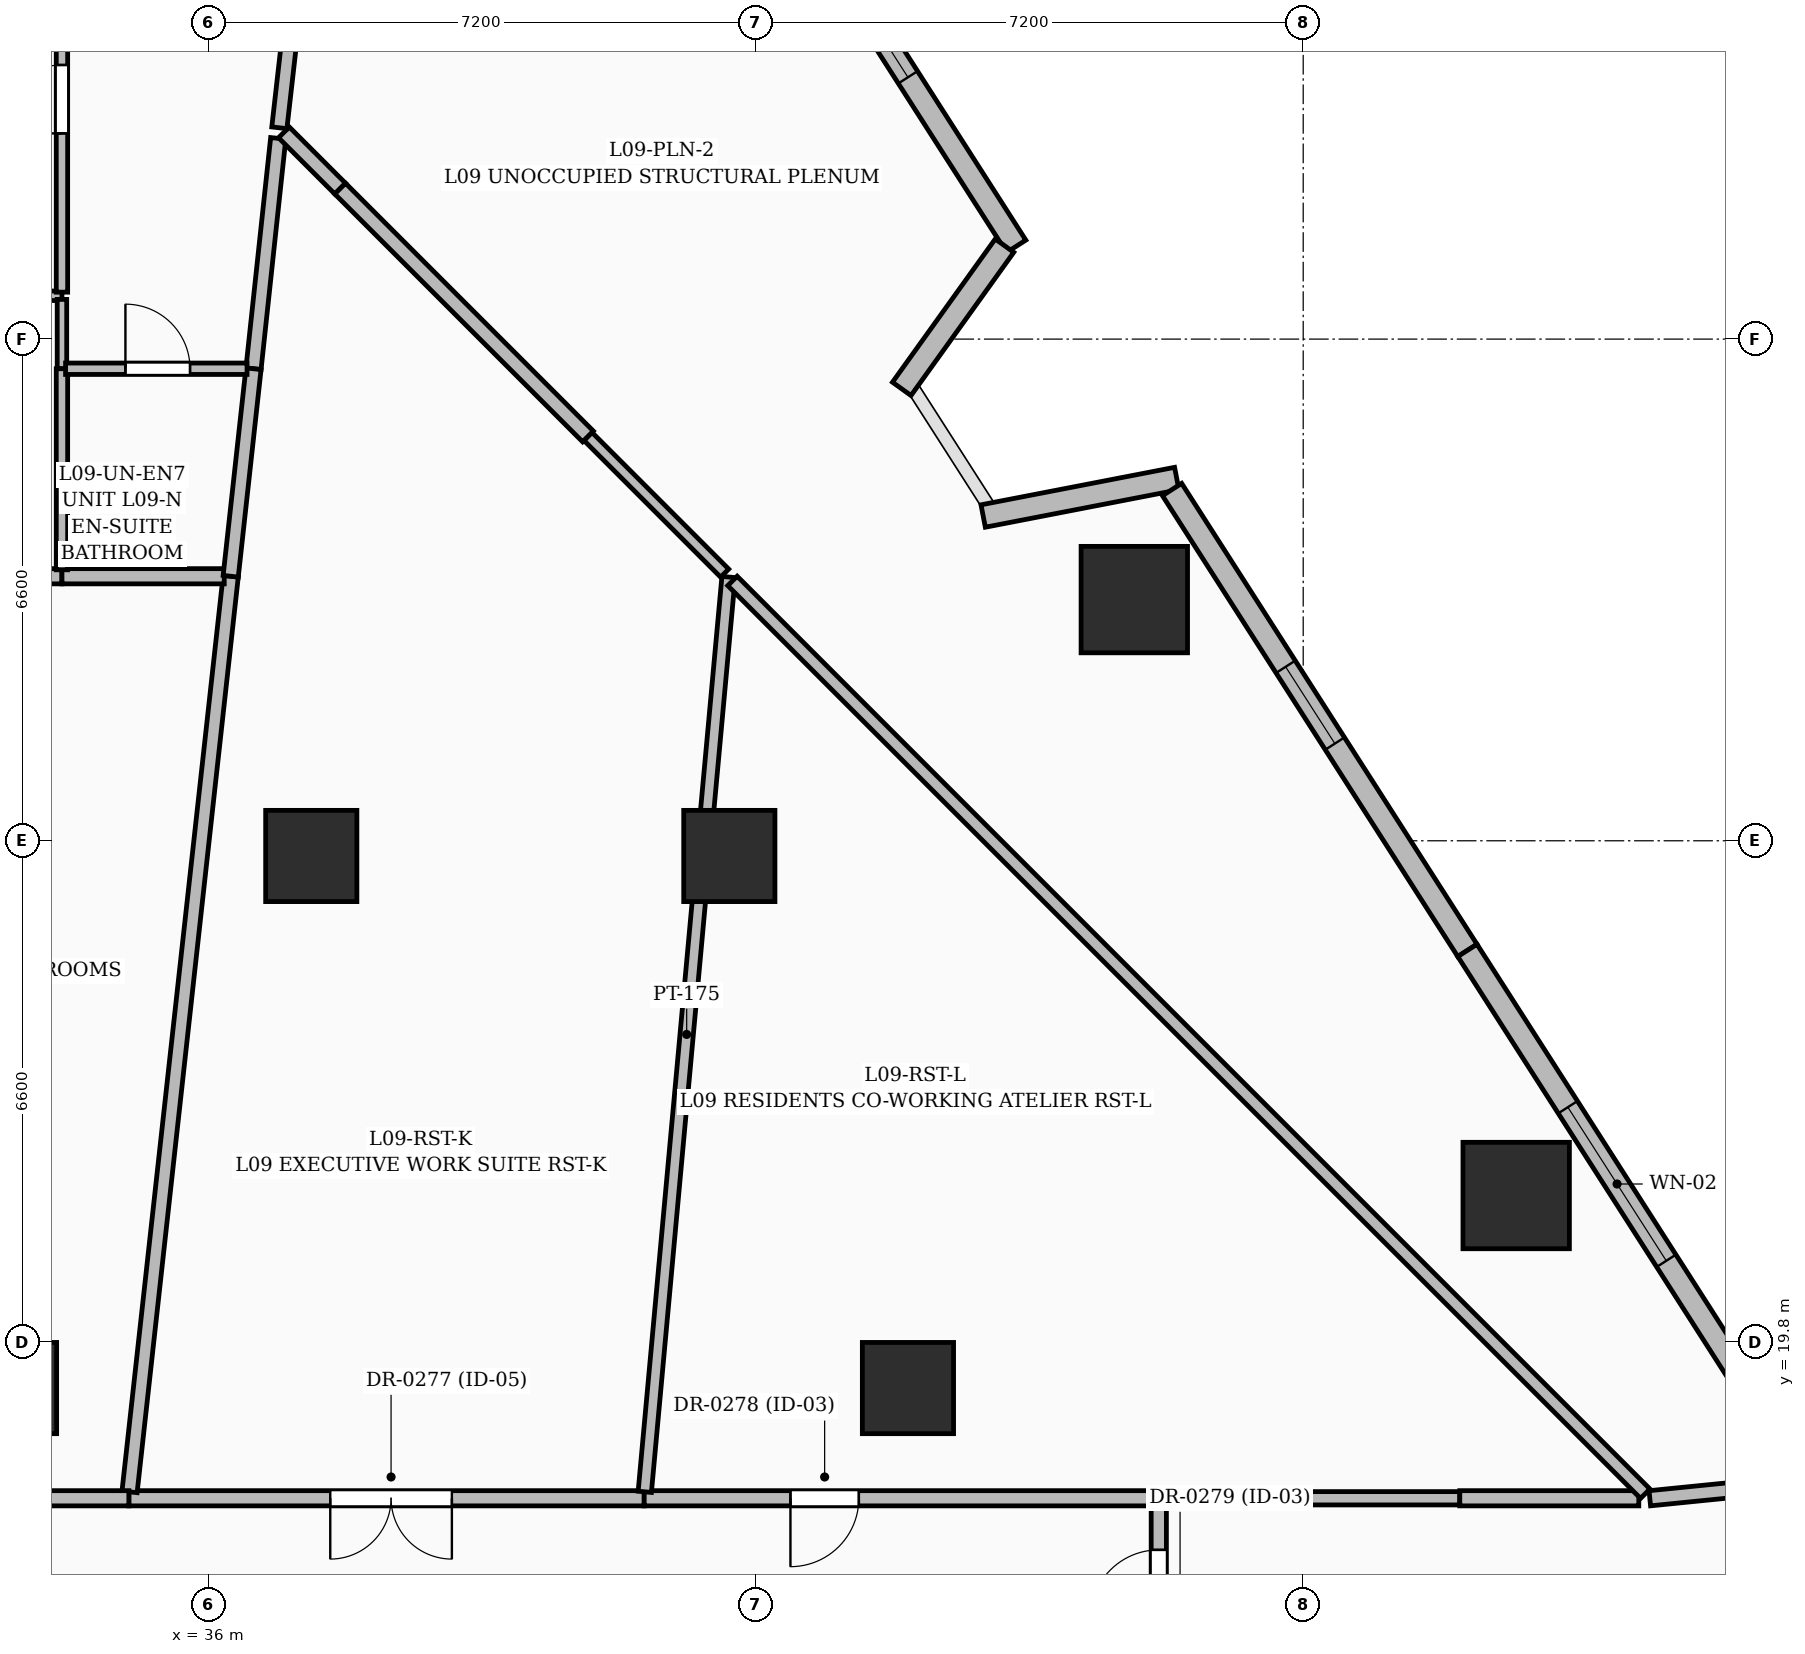
"""IFC4 building model, lengths in metres.
Left out: names, types, materials, properties, quantities, classifications, styles, units other than length and angle.
Written with IfcOpenShell. Run it as: python <this file> out.ifc"""

import sys

from ifc_helpers import new_model, si_unit, direction, frame, frame_2d, origin, origin_2d, place, context, subcontext, project, spatial, rectangle, extrude, element, fill, save


model = new_model("IFC4")
c1 = context("Model", 3, precision=1e-05, world=origin(), true_north=direction((0.0, 1.0)))
c2 = subcontext(c1, "Body", "Model", "MODEL_VIEW")
j1 = project(units=[si_unit("LENGTHUNIT", "METRE"), si_unit("PLANEANGLEUNIT", "RADIAN")], contexts=[c1])
p1 = place(None, origin())
s1 = spatial("IfcSite", under=j1, at=p1, CompositionType="ELEMENT")
p2 = place(p1, origin())
s2 = spatial("IfcBuilding", under=s1, at=p2, CompositionType="ELEMENT")
p3 = place(p2, frame((0.0, 0.0, 42.6)))
s3 = spatial("IfcBuildingStorey", under=s2, at=p3, CompositionType="ELEMENT", Elevation=42.6)
for number, where, z_axis, x_axis in (
    (1, (45.2, 19.2, 0.0), (0.0, 0.0, 1.0), (1.0, 0.0, 0.0)),
    (2, (42.85, 26.2, 0.0), (0.0, 0.0, 1.0), (1.0, 0.0, 0.0)),
    (3, (37.35, 26.2, 0.0), (0.0, 0.0, 1.0), (1.0, 0.0, 0.0)),
    (4, (33.4, 19.2, 0.0), (0.0, 0.0, 1.0), (1.0, 0.0, 0.0)),
):
    element("IfcColumn", number, at=place(p3, frame(where, z_axis=z_axis, x_axis=x_axis)), inside=s3, PredefinedType="COLUMN", context=c2, shape_type="SweptSolid", body=[
        extrude(rectangle(XDim=1.2, YDim=1.2, at=origin_2d()), origin(), (0.0, 0.0, 1.0), 3.6),
    ])
for number, where, z_axis, x_axis in (
    (5, (53.202, 21.733, 0.0), (0.0, 0.0, 1.0), (1.0, 0.0, 0.0)),
    (6, (48.178, 29.573, 0.0), (0.0, 0.0, 1.0), (1.0, 0.0, 0.0)),
):
    element("IfcColumn", number, at=place(p3, frame(where, z_axis=z_axis, x_axis=x_axis)), inside=s3, PredefinedType="COLUMN", context=c2, shape_type="SweptSolid", body=[
        extrude(rectangle(XDim=1.4, YDim=1.4, at=origin_2d()), origin(), (0.0, 0.0, 1.0), 3.6),
    ])
p4 = place(p3, frame((42.677, 40.381, 0.0), z_axis=(0.0, 0.0, 1.0), x_axis=(0.53953753152, -0.841961550239, 0.0)))
e7 = element("IfcWall", 7, at=p4, inside=s3, PredefinedType="SOLIDWALL", context=c2, shape_type="SweptSolid", body=[
    extrude(rectangle(XDim=7.316, YDim=0.3, at=frame_2d((3.658, 0.0))), origin(), (0.0, 0.0, 1.0), 3.35),
])
p5 = place(p4, frame((2.875, 0.0, 0.6)))
e8 = element("IfcOpeningElement", 8, at=p5, cuts=e7, PredefinedType="OPENING", context=c2, shape_type="SweptSolid", body=[
    extrude(rectangle(XDim=1.8, YDim=2.1, at=frame_2d((0.9, 1.05))), frame((0.0, 0.16, 0.0), z_axis=(0.0, -1.0, 0.0), x_axis=(1.0, 0.0, 0.0)), (0.0, 0.0, 1.0), 0.32),
])
p6 = place(p3, frame((46.47, 34.229, 0.0), z_axis=(0.0, 0.0, 1.0), x_axis=(-0.58296983002, -0.812493801384, 0.0)))
e9 = element("IfcWall", 9, at=p6, inside=s3, PredefinedType="SOLIDWALL", context=c2, shape_type="SweptSolid", body=[
    extrude(rectangle(XDim=2.319, YDim=0.3, at=frame_2d((1.159, 0.0))), origin(), (0.0, 0.0, 1.0), 2.375),
])
p7 = place(p3, frame((46.19, 30.672, 0.0), z_axis=(0.0, 0.0, 1.0), x_axis=(0.981760587394, 0.190121406053, 0.0)))
e10 = element("IfcWall", 10, at=p7, inside=s3, PredefinedType="SOLIDWALL", context=c2, shape_type="SweptSolid", body=[
    extrude(rectangle(XDim=2.594, YDim=0.3, at=frame_2d((1.297, 0.0))), origin(), (0.0, 0.0, 1.0), 2.375),
])
p8 = place(p3, frame((48.675, 31.021, 0.0), z_axis=(0.0, 0.0, 1.0), x_axis=(0.539549048356, -0.841954170023, 0.0)))
e11 = element("IfcWall", 11, at=p8, inside=s3, PredefinedType="SOLIDWALL", context=c2, shape_type="SweptSolid", body=[
    extrude(rectangle(XDim=7.201, YDim=0.3, at=frame_2d((3.601, 0.0))), origin(), (0.0, 0.0, 1.0), 3.35),
])
p9 = place(p8, frame((2.77, 0.0, 0.8)))
e12 = element("IfcOpeningElement", 12, at=p9, cuts=e11, PredefinedType="OPENING", context=c2, shape_type="SweptSolid", body=[
    extrude(rectangle(XDim=1.2, YDim=1.8, at=frame_2d((0.6, 0.9))), frame((0.0, 0.16, 0.0), z_axis=(0.0, -1.0, 0.0), x_axis=(1.0, 0.0, 0.0)), (0.0, 0.0, 1.0), 0.32),
])
p10 = place(p3, frame((52.56, 24.958, 0.0), z_axis=(0.0, 0.0, 1.0), x_axis=(0.539510136354, -0.841979104712, 0.0)))
e13 = element("IfcWall", 13, at=p10, inside=s3, PredefinedType="SOLIDWALL", context=c2, shape_type="SweptSolid", body=[
    extrude(rectangle(XDim=7.481, YDim=0.3, at=frame_2d((3.741, 0.0))), origin(), (0.0, 0.0, 1.0), 3.35),
])
p11 = place(p10, frame((2.45, 0.0, 0.6)))
e14 = element("IfcOpeningElement", 14, at=p11, cuts=e13, PredefinedType="OPENING", context=c2, shape_type="SweptSolid", body=[
    extrude(rectangle(XDim=2.4, YDim=2.1, at=frame_2d((1.2, 1.05))), frame((0.0, 0.16, 0.0), z_axis=(0.0, -1.0, 0.0), x_axis=(1.0, 0.0, 0.0)), (0.0, 0.0, 1.0), 0.32),
])
p12 = place(p3, frame((48.5, 15.6, 0.0), z_axis=(0.0, 0.0, 1.0), x_axis=(0.0, 1.0, 0.0)))
e15 = element("IfcWall", 15, at=p12, inside=s3, PredefinedType="PARTITIONING", context=c2, shape_type="SweptSolid", body=[
    extrude(rectangle(XDim=2.15, YDim=0.2, at=frame_2d((1.075, 0.0))), origin(), (0.0, 0.0, 1.0), 2.279),
])
p13 = place(p12, frame((0.571, 0.0, 0.0)))
e16 = element("IfcOpeningElement", 16, at=p13, cuts=e15, PredefinedType="OPENING", context=c2, shape_type="SweptSolid", body=[
    extrude(rectangle(XDim=0.9, YDim=2.1, at=frame_2d((0.45, 1.05))), frame((0.0, 0.11, 0.0), z_axis=(0.0, -1.0, 0.0), x_axis=(1.0, 0.0, 0.0)), (0.0, 0.0, 1.0), 0.22),
])
p14 = place(p3, frame((41.73, 17.75, 0.0), z_axis=(0.0, 0.0, 1.0), x_axis=(-1.0, 0.0, 0.0)))
e17 = element("IfcWall", 17, at=p14, inside=s3, PredefinedType="PARTITIONING", context=c2, shape_type="SweptSolid", body=[
    extrude(rectangle(XDim=6.78, YDim=0.2, at=frame_2d((3.39, 0.0))), origin(), (0.0, 0.0, 1.0), 3.35),
])
p15 = place(p14, frame((2.53, 0.0, 0.0)))
e18 = element("IfcOpeningElement", 18, at=p15, cuts=e17, PredefinedType="OPENING", context=c2, shape_type="SweptSolid", body=[
    extrude(rectangle(XDim=1.6, YDim=2.3, at=frame_2d((0.8, 1.15))), frame((0.0, 0.11, 0.0), z_axis=(0.0, -1.0, 0.0), x_axis=(1.0, 0.0, 0.0)), (0.0, 0.0, 1.0), 0.22),
])
p16 = place(p3, frame((48.415, 17.75, 0.0), z_axis=(0.0, 0.0, 1.0), x_axis=(-1.0, 0.0, 0.0)))
e19 = element("IfcWall", 19, at=p16, inside=s3, PredefinedType="PARTITIONING", context=c2, shape_type="SweptSolid", body=[
    extrude(rectangle(XDim=6.685, YDim=0.2, at=frame_2d((3.343, 0.0))), origin(), (0.0, 0.0, 1.0), 2.309),
])
p17 = place(p16, frame((3.861, 0.0, 0.0)))
e20 = element("IfcOpeningElement", 20, at=p17, cuts=e19, PredefinedType="OPENING", context=c2, shape_type="SweptSolid", body=[
    extrude(rectangle(XDim=0.9, YDim=2.1, at=frame_2d((0.45, 1.05))), frame((0.0, 0.11, 0.0), z_axis=(0.0, -1.0, 0.0), x_axis=(1.0, 0.0, 0.0)), (0.0, 0.0, 1.0), 0.22),
])
p18 = place(p3, frame((52.46, 17.75, 0.0), z_axis=(0.0, 0.0, 1.0), x_axis=(-1.0, 0.0, 0.0)))
e21 = element("IfcWall", 21, at=p18, inside=s3, PredefinedType="PARTITIONING", context=c2, shape_type="SweptSolid", body=[
    extrude(rectangle(XDim=3.875, YDim=0.175, at=frame_2d((1.938, 0.0))), origin(), (0.0, 0.0, 1.0), 2.279),
])
p19 = place(p3, frame((54.815, 17.75, 0.0), z_axis=(0.0, 0.0, 1.0), x_axis=(-1.0, 0.0, 0.0)))
e22 = element("IfcWall", 22, at=p19, inside=s3, PredefinedType="PARTITIONING", context=c2, shape_type="SweptSolid", body=[
    extrude(rectangle(XDim=2.355, YDim=0.2, at=frame_2d((1.177, 0.0))), origin(), (0.0, 0.0, 1.0), 2.787),
])
p20 = place(p3, frame((56.913, 17.946, 0.0), z_axis=(0.0, 0.0, 1.0), x_axis=(-0.995000178554, -0.099873142922, 0.0)))
e23 = element("IfcWall", 23, at=p20, inside=s3, PredefinedType="PARTITIONING", context=c2, shape_type="SweptSolid", body=[
    extrude(rectangle(XDim=1.963, YDim=0.2, at=frame_2d((0.981, 0.0))), origin(), (0.0, 0.0, 1.0), 2.37),
])
p21 = place(p3, frame((34.959, 17.834, 0.0), z_axis=(0.0, 0.0, 1.0), x_axis=(0.109814601961, 0.993952087978, 0.0)))
e24 = element("IfcWall", 24, at=p21, inside=s3, PredefinedType="PARTITIONING", context=c2, shape_type="SweptSolid", body=[
    extrude(rectangle(XDim=12.119, YDim=0.2, at=frame_2d((6.059, 0.0))), origin(), (0.0, 0.0, 1.0), 2.279),
])
p22 = place(p3, frame((34.07, 29.88, 0.0), z_axis=(0.0, 0.0, 1.0), x_axis=(-1.0, 0.0, 0.0)))
e25 = element("IfcWall", 25, at=p22, inside=s3, PredefinedType="PARTITIONING", context=c2, shape_type="SweptSolid", body=[
    extrude(rectangle(XDim=0.77, YDim=0.2, at=frame_2d((0.385, 0.0))), origin(), (0.0, 0.0, 1.0), 3.35),
])
p23 = place(p3, frame((36.205, 29.88, 0.0), z_axis=(0.0, 0.0, 1.0), x_axis=(-1.0, 0.0, 0.0)))
e26 = element("IfcWall", 26, at=p23, inside=s3, PredefinedType="PARTITIONING", context=c2, shape_type="SweptSolid", body=[
    extrude(rectangle(XDim=2.135, YDim=0.2, at=frame_2d((1.067, 0.0))), origin(), (0.0, 0.0, 1.0), 2.279),
])
p24 = place(p3, frame((41.738, 17.835, 0.0), z_axis=(0.0, 0.0, 1.0), x_axis=(0.091205990135, 0.995832047769, 0.0)))
e27 = element("IfcWall", 27, at=p24, inside=s3, PredefinedType="PARTITIONING", context=c2, shape_type="SweptSolid", body=[
    extrude(rectangle(XDim=12.086, YDim=0.175, at=frame_2d((6.043, 0.0))), origin(), (0.0, 0.0, 1.0), 2.279),
])
p25 = place(p3, frame((42.789, 29.921, 0.0), z_axis=(0.0, 0.0, 1.0), x_axis=(-0.707154767802, 0.707058791314, 0.0)))
e28 = element("IfcWall", 28, at=p25, inside=s3, PredefinedType="PARTITIONING", context=c2, shape_type="SweptSolid", body=[
    extrude(rectangle(XDim=2.544, YDim=0.15, at=frame_2d((1.272, 0.0))), origin(), (0.0, 0.0, 1.0), 2.279),
])
p26 = place(p3, frame((36.915, 35.641, 0.0), z_axis=(0.0, 0.0, 1.0), x_axis=(-0.106606653323, -0.994301272989, 0.0)))
e29 = element("IfcWall", 29, at=p26, inside=s3, PredefinedType="PARTITIONING", context=c2, shape_type="SweptSolid", body=[
    extrude(rectangle(XDim=3.048, YDim=0.2, at=frame_2d((1.524, 0.0))), origin(), (0.0, 0.0, 1.0), 2.787),
])
p27 = place(p3, frame((36.59, 32.61, 0.0), z_axis=(0.0, 0.0, 1.0), x_axis=(-0.109241237924, -0.994015267457, 0.0)))
e30 = element("IfcWall", 30, at=p27, inside=s3, PredefinedType="PARTITIONING", context=c2, shape_type="SweptSolid", body=[
    extrude(rectangle(XDim=2.747, YDim=0.2, at=frame_2d((1.373, 0.0))), origin(), (0.0, 0.0, 1.0), 2.787),
])
p28 = place(p3, frame((37.73, 34.98, 0.0), z_axis=(0.0, 0.0, 1.0), x_axis=(-0.707106781187, 0.707106781187, 0.0)))
e31 = element("IfcWall", 31, at=p28, inside=s3, PredefinedType="PARTITIONING", context=c2, shape_type="SweptSolid", body=[
    extrude(rectangle(XDim=1.046, YDim=0.2, at=frame_2d((0.523, 0.0))), origin(), (0.0, 0.0, 1.0), 2.787),
])
p29 = place(p3, frame((40.99, 31.72, 0.0), z_axis=(0.0, 0.0, 1.0), x_axis=(-0.707106781187, 0.707106781187, 0.0)))
e32 = element("IfcWall", 32, at=p29, inside=s3, PredefinedType="PARTITIONING", context=c2, shape_type="SweptSolid", body=[
    extrude(rectangle(XDim=4.61, YDim=0.2, at=frame_2d((2.305, 0.0))), origin(), (0.0, 0.0, 1.0), 2.787),
])
p30 = place(p3, frame((54.9, 17.81, 0.0), z_axis=(0.0, 0.0, 1.0), x_axis=(-0.707106781187, 0.707106781187, 0.0)))
e33 = element("IfcWall", 33, at=p30, inside=s3, PredefinedType="PARTITIONING", context=c2, shape_type="SweptSolid", body=[
    extrude(rectangle(XDim=16.983, YDim=0.175, at=frame_2d((8.491, 0.0))), origin(), (0.0, 0.0, 1.0), 2.279),
])
p31 = place(p3, frame((30.625, 33.57, 0.0), z_axis=(0.0, 0.0, 1.0), x_axis=(1.0, 0.0, 0.0)))
e34 = element("IfcWall", 34, at=p31, inside=s3, PredefinedType="PARTITIONING", context=c2, shape_type="SweptSolid", body=[
    extrude(rectangle(XDim=3.445, YDim=0.125, at=frame_2d((1.723, 0.0))), origin(), (0.0, 0.0, 1.0), 2.279),
])
p32 = place(p31, frame((1.205, 0.0, 0.0)))
e35 = element("IfcOpeningElement", 35, at=p32, cuts=e34, PredefinedType="OPENING", context=c2, shape_type="SweptSolid", body=[
    extrude(rectangle(XDim=0.95, YDim=2.2, at=frame_2d((0.475, 1.1))), frame((0.0, 0.072, 0.0), z_axis=(0.0, -1.0, 0.0), x_axis=(1.0, 0.0, 0.0)), (0.0, 0.0, 1.0), 0.145),
])
p33 = place(p3, frame((34.07, 33.617, 0.0), z_axis=(0.0, 0.0, 1.0), x_axis=(0.0, 1.0, 0.0)))
e36 = element("IfcWall", 36, at=p33, inside=s3, PredefinedType="PARTITIONING", context=c2, shape_type="SweptSolid", body=[
    extrude(rectangle(XDim=5.243, YDim=0.15, at=frame_2d((2.621, 0.0))), origin(), (0.0, 0.0, 1.0), 2.787),
])
p34 = place(p33, frame((2.089, 0.0, 0.0)))
e37 = element("IfcOpeningElement", 37, at=p34, cuts=e36, PredefinedType="OPENING", context=c2, shape_type="SweptSolid", body=[
    extrude(rectangle(XDim=0.9, YDim=2.15, at=frame_2d((0.45, 1.075))), frame((0.0, 0.085, 0.0), z_axis=(0.0, -1.0, 0.0), x_axis=(1.0, 0.0, 0.0)), (0.0, 0.0, 1.0), 0.17),
])
p35 = place(p3, frame((34.07, 32.61, 0.0), z_axis=(0.0, 0.0, 1.0), x_axis=(0.0, 1.0, 0.0)))
e38 = element("IfcWall", 38, at=p35, inside=s3, PredefinedType="PARTITIONING", context=c2, shape_type="SweptSolid", body=[
    extrude(rectangle(XDim=0.912, YDim=0.125, at=frame_2d((0.456, 0.0))), origin(), (0.0, 0.0, 1.0), 2.279),
])
p36 = place(p3, frame((34.07, 29.965, 0.0), z_axis=(0.0, 0.0, 1.0), x_axis=(0.0, 1.0, 0.0)))
e39 = element("IfcWall", 39, at=p36, inside=s3, PredefinedType="PARTITIONING", context=c2, shape_type="SweptSolid", body=[
    extrude(rectangle(XDim=2.645, YDim=0.15, at=frame_2d((1.323, 0.0))), origin(), (0.0, 0.0, 1.0), 2.279),
])
p37 = place(p3, frame((34.117, 32.61, 0.0), z_axis=(0.0, 0.0, 1.0), x_axis=(1.0, 0.0, 0.0)))
e40 = element("IfcWall", 40, at=p37, inside=s3, PredefinedType="PARTITIONING", context=c2, shape_type="SweptSolid", body=[
    extrude(rectangle(XDim=2.387, YDim=0.15, at=frame_2d((1.194, 0.0))), origin(), (0.0, 0.0, 1.0), 2.279),
])
p38 = place(p37, frame((0.788, 0.0, 0.0)))
e41 = element("IfcOpeningElement", 41, at=p38, cuts=e40, PredefinedType="OPENING", context=c2, shape_type="SweptSolid", body=[
    extrude(rectangle(XDim=0.85, YDim=2.1, at=frame_2d((0.425, 1.05))), frame((0.0, 0.085, 0.0), z_axis=(0.0, -1.0, 0.0), x_axis=(1.0, 0.0, 0.0)), (0.0, 0.0, 1.0), 0.17),
])
p39 = place(p3, frame((36.93, 35.78, 0.0), z_axis=(0.0, 0.0, 1.0), x_axis=(0.112900640855, 0.993606282838, 0.0)))
e42 = element("IfcWall", 42, at=p39, inside=s3, PredefinedType="PARTITIONING", context=c2, shape_type="SweptSolid", body=[
    extrude(rectangle(XDim=3.027, YDim=0.2, at=frame_2d((1.514, 0.0))), origin(), (0.0, 0.0, 1.0), 3.35),
])
p40 = place(p3, frame((34.95, 17.75, 0.0), z_axis=(0.0, 0.0, 1.0), x_axis=(-1.0, 0.0, 0.0)))
e43 = element("IfcWall", 43, at=p40, inside=s3, PredefinedType="PARTITIONING", context=c2, shape_type="SweptSolid", body=[
    extrude(rectangle(XDim=1.65, YDim=0.2, at=frame_2d((0.825, 0.0))), origin(), (0.0, 0.0, 1.0), 2.309),
])
p41 = place(p5, origin())
e44 = element("IfcWindow", 44, at=p41, inside=s3, PartitioningType="SINGLE_PANEL", PredefinedType="WINDOW", context=c2, shape_type="SweptSolid", body=[
    extrude(rectangle(XDim=1.8, YDim=2.1, at=frame_2d((0.9, 1.05))), frame((0.0, 0.03, 0.0), z_axis=(0.0, -1.0, 0.0), x_axis=(1.0, 0.0, 0.0)), (0.0, 0.0, 1.0), 0.06),
])
fill(e8, e44)
p42 = place(p9, origin())
e45 = element("IfcWindow", 45, at=p42, inside=s3, PartitioningType="SINGLE_PANEL", PredefinedType="WINDOW", context=c2, shape_type="SweptSolid", body=[
    extrude(rectangle(XDim=1.2, YDim=1.8, at=frame_2d((0.6, 0.9))), frame((0.0, 0.03, 0.0), z_axis=(0.0, -1.0, 0.0), x_axis=(1.0, 0.0, 0.0)), (0.0, 0.0, 1.0), 0.06),
])
fill(e12, e45)
p43 = place(p11, origin())
e46 = element("IfcWindow", 46, at=p43, inside=s3, PartitioningType="SINGLE_PANEL", PredefinedType="WINDOW", context=c2, shape_type="SweptSolid", body=[
    extrude(rectangle(XDim=2.4, YDim=2.1, at=frame_2d((1.2, 1.05))), frame((0.0, 0.03, 0.0), z_axis=(0.0, -1.0, 0.0), x_axis=(1.0, 0.0, 0.0)), (0.0, 0.0, 1.0), 0.06),
])
fill(e14, e46)
p44 = place(p15, origin())
e47 = element("IfcDoor", 47, at=p44, inside=s3, OperationType="DOUBLE_DOOR_SINGLE_SWING", PredefinedType="DOOR", context=c2, shape_type="SweptSolid", body=[
    extrude(rectangle(XDim=1.6, YDim=2.3, at=frame_2d((0.8, 1.15))), frame((0.0, 0.025, 0.0), z_axis=(0.0, -1.0, 0.0), x_axis=(1.0, 0.0, 0.0)), (0.0, 0.0, 1.0), 0.05),
])
fill(e18, e47)
p45 = place(p17, origin())
e48 = element("IfcDoor", 48, at=p45, inside=s3, OperationType="SINGLE_SWING_RIGHT", PredefinedType="DOOR", context=c2, shape_type="SweptSolid", body=[
    extrude(rectangle(XDim=0.9, YDim=2.1, at=frame_2d((0.45, 1.05))), frame((0.0, 0.025, 0.0), z_axis=(0.0, -1.0, 0.0), x_axis=(1.0, 0.0, 0.0)), (0.0, 0.0, 1.0), 0.05),
])
fill(e20, e48)
p46 = place(p13, origin())
e49 = element("IfcDoor", 49, at=p46, inside=s3, OperationType="SINGLE_SWING_LEFT", PredefinedType="DOOR", context=c2, shape_type="SweptSolid", body=[
    extrude(rectangle(XDim=0.9, YDim=2.1, at=frame_2d((0.45, 1.05))), frame((0.0, 0.025, 0.0), z_axis=(0.0, -1.0, 0.0), x_axis=(1.0, 0.0, 0.0)), (0.0, 0.0, 1.0), 0.05),
])
fill(e16, e49)
p47 = place(p34, origin())
e50 = element("IfcDoor", 50, at=p47, inside=s3, OperationType="SINGLE_SWING_LEFT", PredefinedType="DOOR", context=c2, shape_type="SweptSolid", body=[
    extrude(rectangle(XDim=0.9, YDim=2.15, at=frame_2d((0.45, 1.075))), frame((0.0, 0.025, 0.0), z_axis=(0.0, -1.0, 0.0), x_axis=(1.0, 0.0, 0.0)), (0.0, 0.0, 1.0), 0.05),
])
fill(e37, e50)
p48 = place(p38, origin())
e51 = element("IfcDoor", 51, at=p48, inside=s3, OperationType="SINGLE_SWING_LEFT", PredefinedType="DOOR", context=c2, shape_type="SweptSolid", body=[
    extrude(rectangle(XDim=0.85, YDim=2.1, at=frame_2d((0.425, 1.05))), frame((0.0, 0.025, 0.0), z_axis=(0.0, -1.0, 0.0), x_axis=(1.0, 0.0, 0.0)), (0.0, 0.0, 1.0), 0.05),
])
fill(e41, e51)
save(model, sys.argv[1])
